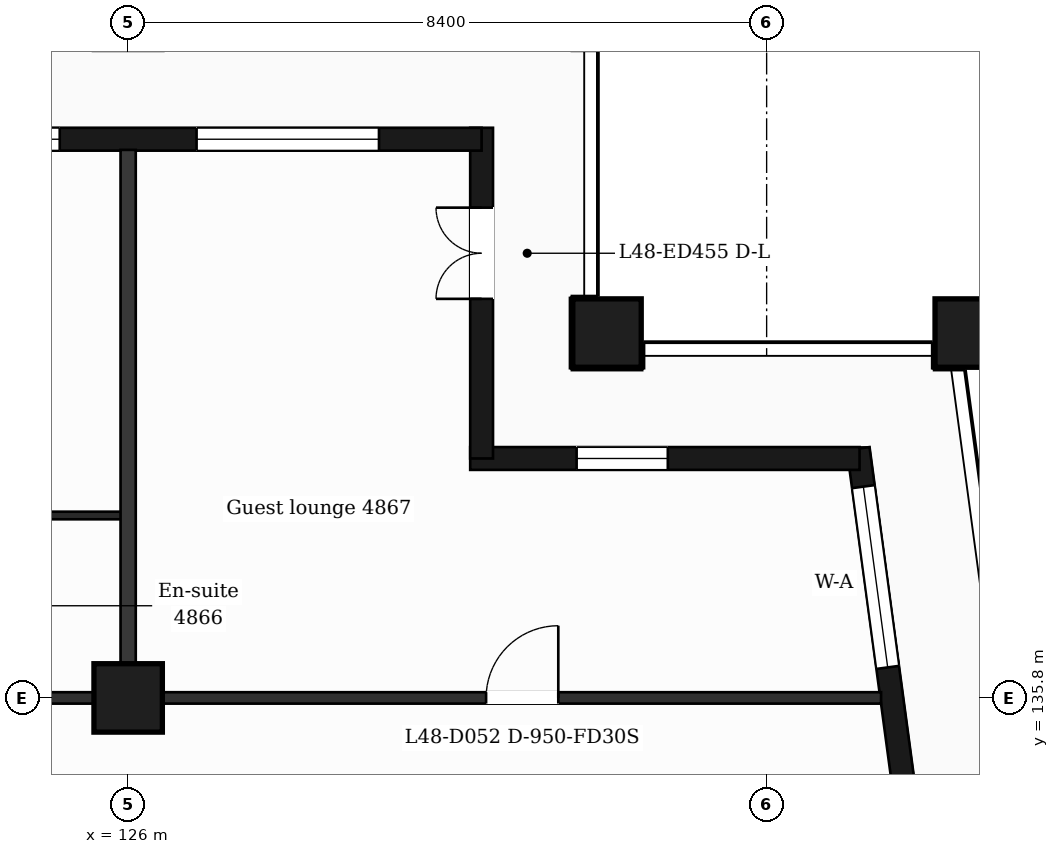
"""IFC4 building model, lengths in metres.
Left out: names, types, materials, properties, quantities, classifications, styles, units other than length and angle.
Written with IfcOpenShell. Run it as: python <this file> out.ifc"""

import sys

from ifc_helpers import new_model, si_unit, direction, frame, frame_2d, origin, origin_2d, place, context, subcontext, project, spatial, rectangle, extrude, element, fill, save


model = new_model("IFC4")
c1 = context("Model", 3, precision=1e-05, world=origin(), true_north=direction((0.0, 1.0)))
c2 = subcontext(c1, "Body", "Model", "MODEL_VIEW")
j1 = project(units=[si_unit("LENGTHUNIT", "METRE"), si_unit("PLANEANGLEUNIT", "RADIAN")], contexts=[c1])
p1 = place(None, origin())
s1 = spatial("IfcSite", under=j1, at=p1, CompositionType="ELEMENT")
p2 = place(p1, origin())
s2 = spatial("IfcBuilding", under=s1, at=p2, CompositionType="ELEMENT")
p3 = place(p2, frame((0.0, 0.0, 202.2)))
s3 = spatial("IfcBuildingStorey", under=s2, at=p3, CompositionType="ELEMENT", Elevation=202.2)
for number, where, z_axis, x_axis in (
    (1, (132.3, 140.6, 0.0), (0.0, 0.0, 1.0), (1.0, 0.0, 0.0)),
    (2, (137.065, 140.6, 0.0), (0.0, 0.0, 1.0), (1.0, 0.0, 0.0)),
    (3, (126.0, 135.8, 0.0), (0.0, 0.0, 1.0), (1.0, 0.0, 0.0)),
):
    element("IfcColumn", number, at=place(p3, frame(where, z_axis=z_axis, x_axis=x_axis)), inside=s3, PredefinedType="COLUMN", context=c2, shape_type="SweptSolid", body=[
        extrude(rectangle(XDim=0.9, YDim=0.9, at=origin_2d()), origin(), (0.0, 0.0, 1.0), 3.7),
    ])
p4 = place(p3, frame((136.504, 132.4, 0.0), z_axis=(0.0, 0.0, 1.0), x_axis=(-0.133399697462, 0.99106231929, 0.0)))
e4 = element("IfcWall", 4, at=p4, inside=s3, PredefinedType="SOLIDWALL", context=c2, shape_type="SweptSolid", body=[
    extrude(rectangle(XDim=6.74, YDim=0.3, at=frame_2d((3.37, 0.0))), origin(), (0.0, 0.0, 1.0), 3.38),
])
p5 = place(p4, frame((1.115, 0.0, 0.0)))
e5 = element("IfcOpeningElement", 5, at=p5, cuts=e4, PredefinedType="OPENING", context=c2, shape_type="SweptSolid", body=[
    extrude(rectangle(XDim=1.2, YDim=2.4, at=frame_2d((0.6, 1.2))), frame((0.0, 0.16, 0.0), z_axis=(0.0, -1.0, 0.0), x_axis=(1.0, 0.0, 0.0)), (0.0, 0.0, 1.0), 0.32),
])
p6 = place(p4, frame((3.835, 0.0, 0.9)))
e6 = element("IfcOpeningElement", 6, at=p6, cuts=e4, PredefinedType="OPENING", context=c2, shape_type="SweptSolid", body=[
    extrude(rectangle(XDim=2.4, YDim=2.1, at=frame_2d((1.2, 1.05))), frame((0.0, 0.16, 0.0), z_axis=(0.0, -1.0, 0.0), x_axis=(1.0, 0.0, 0.0)), (0.0, 0.0, 1.0), 0.32),
])
p7 = place(p3, frame((135.623, 138.95, 0.0), z_axis=(0.0, 0.0, 1.0), x_axis=(-1.0, 0.0, 0.0)))
e7 = element("IfcWall", 7, at=p7, inside=s3, PredefinedType="SOLIDWALL", context=c2, shape_type="SweptSolid", body=[
    extrude(rectangle(XDim=5.123, YDim=0.3, at=frame_2d((2.561, 0.0))), origin(), (0.0, 0.0, 1.0), 3.38),
])
p8 = place(p7, frame((2.523, 0.0, 0.9)))
e8 = element("IfcOpeningElement", 8, at=p8, cuts=e7, PredefinedType="OPENING", context=c2, shape_type="SweptSolid", body=[
    extrude(rectangle(XDim=1.2, YDim=2.1, at=frame_2d((0.6, 1.05))), frame((0.0, 0.16, 0.0), z_axis=(0.0, -1.0, 0.0), x_axis=(1.0, 0.0, 0.0)), (0.0, 0.0, 1.0), 0.32),
])
p9 = place(p3, frame((130.65, 138.95, 0.0), z_axis=(0.0, 0.0, 1.0), x_axis=(0.0, 1.0, 0.0)))
e9 = element("IfcWall", 9, at=p9, inside=s3, PredefinedType="SOLIDWALL", context=c2, shape_type="SweptSolid", body=[
    extrude(rectangle(XDim=4.35, YDim=0.3, at=frame_2d((2.175, 0.0))), origin(), (0.0, 0.0, 1.0), 3.38),
])
p10 = place(p9, frame((2.1, 0.0, 0.0)))
e10 = element("IfcOpeningElement", 10, at=p10, cuts=e9, PredefinedType="OPENING", context=c2, shape_type="SweptSolid", body=[
    extrude(rectangle(XDim=1.2, YDim=2.4, at=frame_2d((0.6, 1.2))), frame((0.0, 0.16, 0.0), z_axis=(0.0, -1.0, 0.0), x_axis=(1.0, 0.0, 0.0)), (0.0, 0.0, 1.0), 0.32),
])
p11 = place(p3, frame((130.65, 143.15, 0.0), z_axis=(0.0, 0.0, 1.0), x_axis=(-1.0, 0.0, 0.0)))
e11 = element("IfcWall", 11, at=p11, inside=s3, PredefinedType="SOLIDWALL", context=c2, shape_type="SweptSolid", body=[
    extrude(rectangle(XDim=16.35, YDim=0.3, at=frame_2d((8.175, 0.0))), origin(), (0.0, 0.0, 1.0), 3.38),
])
p12 = place(p11, frame((1.35, 0.0, 0.9)))
e12 = element("IfcOpeningElement", 12, at=p12, cuts=e11, PredefinedType="OPENING", context=c2, shape_type="SweptSolid", body=[
    extrude(rectangle(XDim=2.4, YDim=2.1, at=frame_2d((1.2, 1.05))), frame((0.0, 0.16, 0.0), z_axis=(0.0, -1.0, 0.0), x_axis=(1.0, 0.0, 0.0)), (0.0, 0.0, 1.0), 0.32),
])
p13 = place(p11, frame((5.55, 0.0, 0.9)))
e13 = element("IfcOpeningElement", 13, at=p13, cuts=e11, PredefinedType="OPENING", context=c2, shape_type="SweptSolid", body=[
    extrude(rectangle(XDim=2.4, YDim=2.1, at=frame_2d((1.2, 1.05))), frame((0.0, 0.16, 0.0), z_axis=(0.0, -1.0, 0.0), x_axis=(1.0, 0.0, 0.0)), (0.0, 0.0, 1.0), 0.32),
])
p14 = place(p11, frame((9.45, 0.0, 0.0)))
e14 = element("IfcOpeningElement", 14, at=p14, cuts=e11, PredefinedType="OPENING", context=c2, shape_type="SweptSolid", body=[
    extrude(rectangle(XDim=1.2, YDim=2.4, at=frame_2d((0.6, 1.2))), frame((0.0, 0.16, 0.0), z_axis=(0.0, -1.0, 0.0), x_axis=(1.0, 0.0, 0.0)), (0.0, 0.0, 1.0), 0.32),
])
p15 = place(p11, frame((11.25, 0.0, 0.9)))
e15 = element("IfcOpeningElement", 15, at=p15, cuts=e11, PredefinedType="OPENING", context=c2, shape_type="SweptSolid", body=[
    extrude(rectangle(XDim=1.2, YDim=2.1, at=frame_2d((0.6, 1.05))), frame((0.0, 0.16, 0.0), z_axis=(0.0, -1.0, 0.0), x_axis=(1.0, 0.0, 0.0)), (0.0, 0.0, 1.0), 0.32),
])
p16 = place(p11, frame((13.45, 0.0, 0.9)))
e16 = element("IfcOpeningElement", 16, at=p16, cuts=e11, PredefinedType="OPENING", context=c2, shape_type="SweptSolid", body=[
    extrude(rectangle(XDim=2.4, YDim=2.1, at=frame_2d((1.2, 1.05))), frame((0.0, 0.16, 0.0), z_axis=(0.0, -1.0, 0.0), x_axis=(1.0, 0.0, 0.0)), (0.0, 0.0, 1.0), 0.32),
])
p17 = place(p3, frame((90.895, 135.8, 0.0), z_axis=(0.0, 0.0, 1.0), x_axis=(1.0, 0.0, 0.0)))
e17 = element("IfcWall", 17, at=p17, inside=s3, PredefinedType="PARTITIONING", context=c2, shape_type="SweptSolid", body=[
    extrude(rectangle(XDim=45.011, YDim=0.15, at=frame_2d((22.505, 0.0))), origin(), (0.0, 0.0, 1.0), 3.38),
])
p18 = place(p17, frame((7.675, 0.0, 0.0)))
e18 = element("IfcOpeningElement", 18, at=p18, cuts=e17, PredefinedType="OPENING", context=c2, shape_type="SweptSolid", body=[
    extrude(rectangle(XDim=1.0, YDim=2.1, at=frame_2d((0.5, 1.05))), frame((0.0, 0.085, 0.0), z_axis=(0.0, -1.0, 0.0), x_axis=(1.0, 0.0, 0.0)), (0.0, 0.0, 1.0), 0.17),
])
p19 = place(p17, frame((10.575, 0.0, 0.0)))
e19 = element("IfcOpeningElement", 19, at=p19, cuts=e17, PredefinedType="OPENING", context=c2, shape_type="SweptSolid", body=[
    extrude(rectangle(XDim=0.95, YDim=2.1, at=frame_2d((0.475, 1.05))), frame((0.0, 0.085, 0.0), z_axis=(0.0, -1.0, 0.0), x_axis=(1.0, 0.0, 0.0)), (0.0, 0.0, 1.0), 0.17),
])
p20 = place(p17, frame((18.979, 0.0, 0.0)))
e20 = element("IfcOpeningElement", 20, at=p20, cuts=e17, PredefinedType="OPENING", context=c2, shape_type="SweptSolid", body=[
    extrude(rectangle(XDim=0.95, YDim=2.1, at=frame_2d((0.475, 1.05))), frame((0.0, 0.085, 0.0), z_axis=(0.0, -1.0, 0.0), x_axis=(1.0, 0.0, 0.0)), (0.0, 0.0, 1.0), 0.17),
])
p21 = place(p17, frame((23.035, 0.0, 0.0)))
e21 = element("IfcOpeningElement", 21, at=p21, cuts=e17, PredefinedType="OPENING", context=c2, shape_type="SweptSolid", body=[
    extrude(rectangle(XDim=0.95, YDim=2.1, at=frame_2d((0.475, 1.05))), frame((0.0, 0.085, 0.0), z_axis=(0.0, -1.0, 0.0), x_axis=(1.0, 0.0, 0.0)), (0.0, 0.0, 1.0), 0.17),
])
p22 = place(p17, frame((29.23, 0.0, 0.0)))
e22 = element("IfcOpeningElement", 22, at=p22, cuts=e17, PredefinedType="OPENING", context=c2, shape_type="SweptSolid", body=[
    extrude(rectangle(XDim=0.95, YDim=2.1, at=frame_2d((0.475, 1.05))), frame((0.0, 0.085, 0.0), z_axis=(0.0, -1.0, 0.0), x_axis=(1.0, 0.0, 0.0)), (0.0, 0.0, 1.0), 0.17),
])
p23 = place(p17, frame((31.367, 0.0, 0.0)))
e23 = element("IfcOpeningElement", 23, at=p23, cuts=e17, PredefinedType="OPENING", context=c2, shape_type="SweptSolid", body=[
    extrude(rectangle(XDim=0.95, YDim=2.1, at=frame_2d((0.475, 1.05))), frame((0.0, 0.085, 0.0), z_axis=(0.0, -1.0, 0.0), x_axis=(1.0, 0.0, 0.0)), (0.0, 0.0, 1.0), 0.17),
])
p24 = place(p17, frame((39.814, 0.0, 0.0)))
e24 = element("IfcOpeningElement", 24, at=p24, cuts=e17, PredefinedType="OPENING", context=c2, shape_type="SweptSolid", body=[
    extrude(rectangle(XDim=0.95, YDim=2.1, at=frame_2d((0.475, 1.05))), frame((0.0, 0.085, 0.0), z_axis=(0.0, -1.0, 0.0), x_axis=(1.0, 0.0, 0.0)), (0.0, 0.0, 1.0), 0.17),
])
p25 = place(p3, frame((123.85, 138.2, 0.0), z_axis=(0.0, 0.0, 1.0), x_axis=(1.0, 0.0, 0.0)))
e25 = element("IfcWall", 25, at=p25, inside=s3, PredefinedType="PARTITIONING", context=c2, shape_type="SweptSolid", body=[
    extrude(rectangle(XDim=2.15, YDim=0.1, at=frame_2d((1.075, 0.0))), origin(), (0.0, 0.0, 1.0), 3.38),
])
p26 = place(p3, frame((126.0, 135.875, 0.0), z_axis=(0.0, 0.0, 1.0), x_axis=(0.0, 1.0, 0.0)))
e26 = element("IfcWall", 26, at=p26, inside=s3, PredefinedType="PARTITIONING", context=c2, shape_type="SweptSolid", body=[
    extrude(rectangle(XDim=7.135, YDim=0.2, at=frame_2d((3.567, 0.0))), origin(), (0.0, 0.0, 1.0), 3.38),
])
p27 = place(p6, origin())
e27 = element("IfcWindow", 27, at=p27, inside=s3, PartitioningType="SINGLE_PANEL", PredefinedType="WINDOW", context=c2, shape_type="SweptSolid", body=[
    extrude(rectangle(XDim=2.4, YDim=2.1, at=frame_2d((1.2, 1.05))), frame((0.0, 0.03, 0.0), z_axis=(0.0, -1.0, 0.0), x_axis=(1.0, 0.0, 0.0)), (0.0, 0.0, 1.0), 0.06),
])
fill(e6, e27)
p28 = place(p8, origin())
e28 = element("IfcWindow", 28, at=p28, inside=s3, PartitioningType="SINGLE_PANEL", PredefinedType="WINDOW", context=c2, shape_type="SweptSolid", body=[
    extrude(rectangle(XDim=1.2, YDim=2.1, at=frame_2d((0.6, 1.05))), frame((0.0, 0.03, 0.0), z_axis=(0.0, -1.0, 0.0), x_axis=(1.0, 0.0, 0.0)), (0.0, 0.0, 1.0), 0.06),
])
fill(e8, e28)
p29 = place(p10, origin())
e29 = element("IfcDoor", 29, at=p29, inside=s3, OperationType="DOUBLE_DOOR_SINGLE_SWING", PredefinedType="DOOR", context=c2, shape_type="SweptSolid", body=[
    extrude(rectangle(XDim=1.2, YDim=2.4, at=frame_2d((0.6, 1.2))), frame((0.0, 0.025, 0.0), z_axis=(0.0, -1.0, 0.0), x_axis=(1.0, 0.0, 0.0)), (0.0, 0.0, 1.0), 0.05),
])
fill(e10, e29)
p30 = place(p12, origin())
e30 = element("IfcWindow", 30, at=p30, inside=s3, PartitioningType="SINGLE_PANEL", PredefinedType="WINDOW", context=c2, shape_type="SweptSolid", body=[
    extrude(rectangle(XDim=2.4, YDim=2.1, at=frame_2d((1.2, 1.05))), frame((0.0, 0.03, 0.0), z_axis=(0.0, -1.0, 0.0), x_axis=(1.0, 0.0, 0.0)), (0.0, 0.0, 1.0), 0.06),
])
fill(e12, e30)
p31 = place(p13, origin())
e31 = element("IfcWindow", 31, at=p31, inside=s3, PartitioningType="SINGLE_PANEL", PredefinedType="WINDOW", context=c2, shape_type="SweptSolid", body=[
    extrude(rectangle(XDim=2.4, YDim=2.1, at=frame_2d((1.2, 1.05))), frame((0.0, 0.03, 0.0), z_axis=(0.0, -1.0, 0.0), x_axis=(1.0, 0.0, 0.0)), (0.0, 0.0, 1.0), 0.06),
])
fill(e13, e31)
p32 = place(p24, origin())
e32 = element("IfcDoor", 32, at=p32, inside=s3, OperationType="SINGLE_SWING_RIGHT", PredefinedType="DOOR", context=c2, shape_type="SweptSolid", body=[
    extrude(rectangle(XDim=0.95, YDim=2.1, at=frame_2d((0.475, 1.05))), frame((0.0, 0.025, 0.0), z_axis=(0.0, -1.0, 0.0), x_axis=(1.0, 0.0, 0.0)), (0.0, 0.0, 1.0), 0.05),
])
fill(e24, e32)
save(model, sys.argv[1])
